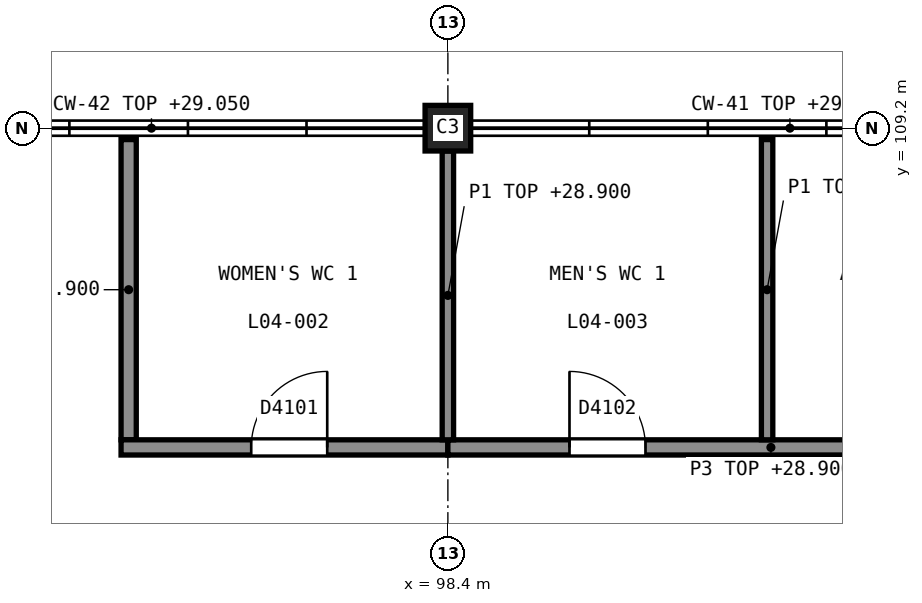
"""IFC4 building model, lengths in metres.
Left out: names, types, materials, properties, quantities, classifications, styles, units other than length and angle.
Written with IfcOpenShell. Run it as: python <this file> out.ifc"""

import sys

from ifc_helpers import new_model, si_unit, direction, frame, frame_2d, origin, origin_2d, place, context, subcontext, project, spatial, rectangle, extrude, element, fill, save


model = new_model("IFC4")
c1 = context("Model", 3, precision=1e-05, world=origin(), true_north=direction((0.0, 1.0)))
c2 = subcontext(c1, "Body", "Model", "MODEL_VIEW")
j1 = project(units=[si_unit("LENGTHUNIT", "METRE"), si_unit("PLANEANGLEUNIT", "RADIAN")], contexts=[c1])
p1 = place(None, origin())
s1 = spatial("IfcSite", under=j1, at=p1, CompositionType="ELEMENT")
p2 = place(p1, origin())
s2 = spatial("IfcBuilding", under=s1, at=p2, CompositionType="ELEMENT")
p3 = place(p2, frame((0.0, 0.0, 25.0)))
s3 = spatial("IfcBuildingStorey", under=s2, at=p3, CompositionType="ELEMENT", Elevation=25.0)
p4 = place(p3, frame((98.4, 109.2, 0.0), z_axis=(0.0, 0.0, 1.0), x_axis=(1.0, 0.0, 0.0)))
e1 = element("IfcColumn", 1, at=p4, inside=s3, PredefinedType="COLUMN", context=c2, shape_type="SweptSolid", body=[
    extrude(rectangle(XDim=0.6, YDim=0.6, at=origin_2d()), origin(), (0.0, 0.0, 1.0), 5.0),
])
p5 = place(p3, frame((94.2, 105.1, 0.0), z_axis=(0.0, 0.0, 1.0), x_axis=(0.0, 1.0, 0.0)))
e2 = element("IfcWall", 2, at=p5, inside=s3, PredefinedType="PARTITIONING", context=c2, shape_type="SweptSolid", body=[
    extrude(rectangle(XDim=3.95, YDim=0.2, at=frame_2d((1.975, 0.0))), origin(), (0.0, 0.0, 1.0), 3.9),
])
p6 = place(p3, frame((94.1, 105.0, 0.0), z_axis=(0.0, 0.0, 1.0), x_axis=(1.0, 0.0, 0.0)))
e3 = element("IfcWall", 3, at=p6, inside=s3, PredefinedType="PARTITIONING", context=c2, shape_type="SweptSolid", body=[
    extrude(rectangle(XDim=4.3, YDim=0.2, at=frame_2d((2.15, 0.0))), origin(), (0.0, 0.0, 1.0), 3.9),
])
p7 = place(p6, frame((1.712, 0.0, 0.0)))
e4 = element("IfcOpeningElement", 4, at=p7, cuts=e3, PredefinedType="OPENING", context=c2, shape_type="SweptSolid", body=[
    extrude(rectangle(XDim=1.0, YDim=2.1, at=frame_2d((0.5, 1.05))), frame((0.0, 0.11, 0.0), z_axis=(0.0, -1.0, 0.0), x_axis=(1.0, 0.0, 0.0)), (0.0, 0.0, 1.0), 0.22),
])
p8 = place(p3, frame((98.4, 105.0, 0.0), z_axis=(0.0, 0.0, 1.0), x_axis=(1.0, 0.0, 0.0)))
e5 = element("IfcWall", 5, at=p8, inside=s3, PredefinedType="PARTITIONING", context=c2, shape_type="SweptSolid", body=[
    extrude(rectangle(XDim=8.5, YDim=0.2, at=frame_2d((4.25, 0.0))), origin(), (0.0, 0.0, 1.0), 3.9),
])
p9 = place(p8, frame((1.6, 0.0, 0.0)))
e6 = element("IfcOpeningElement", 6, at=p9, cuts=e5, PredefinedType="OPENING", context=c2, shape_type="SweptSolid", body=[
    extrude(rectangle(XDim=1.0, YDim=2.1, at=frame_2d((0.5, 1.05))), frame((0.0, 0.11, 0.0), z_axis=(0.0, -1.0, 0.0), x_axis=(1.0, 0.0, 0.0)), (0.0, 0.0, 1.0), 0.22),
])
p10 = place(p8, frame((5.788, 0.0, 0.0)))
e7 = element("IfcOpeningElement", 7, at=p10, cuts=e5, PredefinedType="OPENING", context=c2, shape_type="SweptSolid", body=[
    extrude(rectangle(XDim=1.0, YDim=2.1, at=frame_2d((0.5, 1.05))), frame((0.0, 0.11, 0.0), z_axis=(0.0, -1.0, 0.0), x_axis=(1.0, 0.0, 0.0)), (0.0, 0.0, 1.0), 0.22),
])
p11 = place(p3, frame((98.4, 105.1, 0.0), z_axis=(0.0, 0.0, 1.0), x_axis=(0.0, 1.0, 0.0)))
e8 = element("IfcWall", 8, at=p11, inside=s3, PredefinedType="PARTITIONING", context=c2, shape_type="SweptSolid", body=[
    extrude(rectangle(XDim=3.8, YDim=0.15, at=frame_2d((1.9, 0.0))), origin(), (0.0, 0.0, 1.0), 3.9),
])
p12 = place(p3, frame((102.6, 105.1, 0.0), z_axis=(0.0, 0.0, 1.0), x_axis=(0.0, 1.0, 0.0)))
e9 = element("IfcWall", 9, at=p12, inside=s3, PredefinedType="PARTITIONING", context=c2, shape_type="SweptSolid", body=[
    extrude(rectangle(XDim=3.95, YDim=0.15, at=frame_2d((1.975, 0.0))), origin(), (0.0, 0.0, 1.0), 3.9),
])
p13 = place(p7, origin())
e10 = element("IfcDoor", 10, at=p13, inside=s3, OperationType="SINGLE_SWING_LEFT", PredefinedType="DOOR", context=c2, shape_type="SweptSolid", body=[
    extrude(rectangle(XDim=1.0, YDim=2.1, at=frame_2d((0.5, 1.05))), frame((0.0, 0.025, 0.0), z_axis=(0.0, -1.0, 0.0), x_axis=(1.0, 0.0, 0.0)), (0.0, 0.0, 1.0), 0.05),
])
fill(e4, e10)
p14 = place(p9, origin())
e11 = element("IfcDoor", 11, at=p14, inside=s3, OperationType="SINGLE_SWING_RIGHT", PredefinedType="DOOR", context=c2, shape_type="SweptSolid", body=[
    extrude(rectangle(XDim=1.0, YDim=2.1, at=frame_2d((0.5, 1.05))), frame((0.0, 0.025, 0.0), z_axis=(0.0, -1.0, 0.0), x_axis=(1.0, 0.0, 0.0)), (0.0, 0.0, 1.0), 0.05),
])
fill(e6, e11)
save(model, sys.argv[1])
